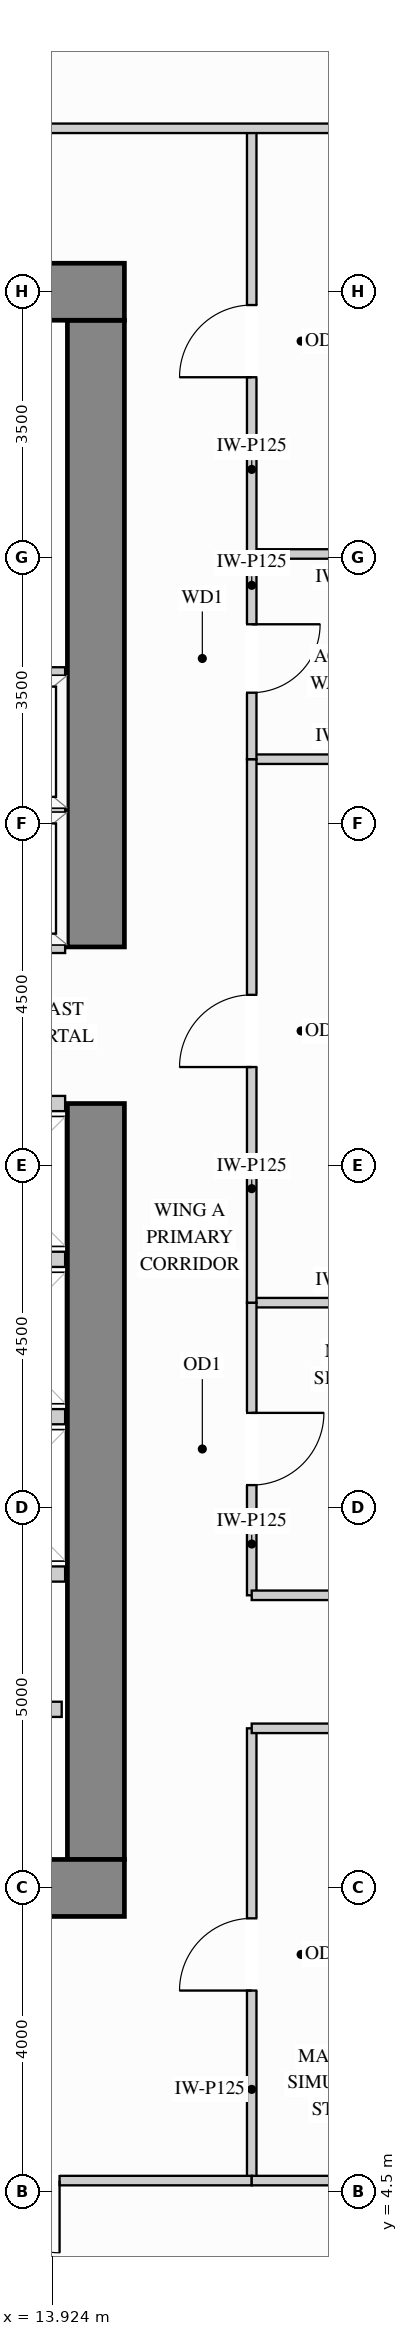
"""IFC4 building model, lengths in metres.
Left out: names, types, materials, properties, quantities, classifications, styles, units other than length and angle.
Written with IfcOpenShell. Run it as: python <this file> out.ifc"""

import sys

from ifc_helpers import new_model, si_unit, direction, frame, frame_2d, origin, place, context, subcontext, project, spatial, rectangle, extrude, source, transform, mapped, element, fill, save


model = new_model("IFC4")
c1 = context("Model", 3, precision=1e-05, world=origin(), true_north=direction((0.0, 1.0)))
c2 = subcontext(c1, "Body", "Model", "MODEL_VIEW")
j1 = project(units=[si_unit("LENGTHUNIT", "METRE"), si_unit("PLANEANGLEUNIT", "RADIAN")], contexts=[c1])
p1 = place(None, origin())
s1 = spatial("IfcSite", under=j1, at=p1, CompositionType="ELEMENT")
p2 = place(p1, origin())
s2 = spatial("IfcBuilding", under=s1, at=p2, CompositionType="ELEMENT")
p3 = place(p2, frame((0.0, 0.0, 102.6)))
s3 = spatial("IfcBuildingStorey", under=s2, at=p3, CompositionType="ELEMENT", Elevation=102.6)
m1 = source(origin(), c2, "Body", "SweptSolid", [
    extrude(rectangle(XDim=9.945, YDim=0.75, at=frame_2d((4.973, 0.0))), origin(), (0.0, 0.0, 1.0), 3.38),
])
p4 = place(p3, frame((14.5, 8.875, 0.0), z_axis=(0.0, 0.0, 1.0), x_axis=(0.0, 1.0, 0.0)))
e1 = element("IfcWall", 1, at=p4, inside=s3, PredefinedType="SHEAR", context=c2, shape_type="MappedRepresentation", body=[
    mapped(m1, transform((0.0, 0.0, 0.0), x_axis=(1.0, 0.0, 0.0), y_axis=(0.0, 1.0, 0.0), z_axis=(0.0, 0.0, 1.0))),
])
m2 = source(origin(), c2, "Body", "SweptSolid", [
    extrude(rectangle(XDim=8.245, YDim=0.75, at=frame_2d((4.123, 0.0))), origin(), (0.0, 0.0, 1.0), 3.38),
])
p5 = place(p3, frame((14.5, 20.88, 0.0), z_axis=(0.0, 0.0, 1.0), x_axis=(0.0, 1.0, 0.0)))
e2 = element("IfcWall", 2, at=p5, inside=s3, PredefinedType="SHEAR", context=c2, shape_type="MappedRepresentation", body=[
    mapped(m2, transform((0.0, 0.0, 0.0), x_axis=(1.0, 0.0, 0.0), y_axis=(0.0, 1.0, 0.0), z_axis=(0.0, 0.0, 1.0))),
])
m3 = source(origin(), c2, "Body", "SweptSolid", [
    extrude(rectangle(XDim=10.75, YDim=0.75, at=frame_2d((5.375, 0.0))), origin(), (0.0, 0.0, 1.0), 3.38),
])
for number, where, z_axis, x_axis in (
    (3, (4.125, 29.5, 0.0), (0.0, 0.0, 1.0), (1.0, 0.0, 0.0)),
    (4, (4.125, 8.5, 0.0), (0.0, 0.0, 1.0), (1.0, 0.0, 0.0)),
):
    element("IfcWall", number, at=place(p3, frame(where, z_axis=z_axis, x_axis=x_axis)), inside=s3, PredefinedType="SHEAR", context=c2, shape_type="MappedRepresentation", body=[
        mapped(m3, transform((0.0, 0.0, 0.0), x_axis=(1.0, 0.0, 0.0), y_axis=(0.0, 1.0, 0.0), z_axis=(0.0, 0.0, 1.0))),
    ])
m4 = source(origin(), c2, "Body", "SweptSolid", [
    extrude(rectangle(XDim=2.6, YDim=0.125, at=frame_2d((1.3, 0.0))), origin(), (0.0, 0.0, 1.0), 3.365),
])
p6 = place(p3, frame((16.55, 16.2, 0.0), z_axis=(0.0, 0.0, 1.0), x_axis=(1.0, 0.0, 0.0)))
e5 = element("IfcWall", 5, at=p6, inside=s3, PredefinedType="PARTITIONING", context=c2, shape_type="MappedRepresentation", body=[
    mapped(m4, transform((0.0, 0.0, 0.0), x_axis=(1.0, 0.0, 0.0), y_axis=(0.0, 1.0, 0.0), z_axis=(0.0, 0.0, 1.0))),
])
m5 = source(origin(), c2, "Body", "SweptSolid", [
    extrude(rectangle(XDim=2.598, YDim=0.125, at=frame_2d((1.299, 0.0))), origin(), (0.0, 0.0, 1.0), 3.365),
])
for number, where, z_axis, x_axis in (
    (6, (16.55, 23.35, 0.0), (0.0, 0.0, 1.0), (1.0, 0.0, 0.0)),
    (7, (16.55, 26.05, 0.0), (0.0, 0.0, 1.0), (1.0, 0.0, 0.0)),
):
    element("IfcWall", number, at=place(p3, frame(where, z_axis=z_axis, x_axis=x_axis)), inside=s3, PredefinedType="PARTITIONING", context=c2, shape_type="MappedRepresentation", body=[
        mapped(m5, transform((0.0, 0.0, 0.0), x_axis=(1.0, 0.0, 0.0), y_axis=(0.0, 1.0, 0.0), z_axis=(0.0, 0.0, 1.0))),
    ])
p7 = place(p3, frame((16.55, 12.35, 0.0), z_axis=(0.0, 0.0, 1.0), x_axis=(0.0, 1.0, 0.0)))
e8 = element("IfcWall", 8, at=p7, inside=s3, PredefinedType="PARTITIONING", context=c2, shape_type="SweptSolid", body=[
    extrude(rectangle(XDim=3.85, YDim=0.125, at=frame_2d((1.925, 0.0))), origin(), (0.0, 0.0, 1.0), 3.365),
])
p8 = place(p7, frame((1.45, 0.0, 0.0)))
e9 = element("IfcOpeningElement", 9, at=p8, cuts=e8, PredefinedType="OPENING", context=c2, shape_type="SweptSolid", body=[
    extrude(rectangle(XDim=0.95, YDim=2.15, at=frame_2d((0.475, 1.075))), frame((0.0, 0.073, 0.0), z_axis=(0.0, -1.0, 0.0), x_axis=(1.0, 0.0, 0.0)), (0.0, 0.0, 1.0), 0.145),
])
p9 = place(p3, frame((16.55, 16.2, 0.0), z_axis=(0.0, 0.0, 1.0), x_axis=(0.0, 1.0, 0.0)))
e10 = element("IfcWall", 10, at=p9, inside=s3, PredefinedType="PARTITIONING", context=c2, shape_type="SweptSolid", body=[
    extrude(rectangle(XDim=7.15, YDim=0.125, at=frame_2d((3.575, 0.0))), origin(), (0.0, 0.0, 1.0), 3.365),
])
p10 = place(p9, frame((3.1, 0.0, 0.0)))
e11 = element("IfcOpeningElement", 11, at=p10, cuts=e10, PredefinedType="OPENING", context=c2, shape_type="SweptSolid", body=[
    extrude(rectangle(XDim=0.95, YDim=2.15, at=frame_2d((0.475, 1.075))), frame((0.0, 0.073, 0.0), z_axis=(0.0, -1.0, 0.0), x_axis=(1.0, 0.0, 0.0)), (0.0, 0.0, 1.0), 0.145),
])
p11 = place(p3, frame((16.55, 26.05, 0.0), z_axis=(0.0, 0.0, 1.0), x_axis=(0.0, 1.0, 0.0)))
e12 = element("IfcWall", 12, at=p11, inside=s3, PredefinedType="PARTITIONING", context=c2, shape_type="SweptSolid", body=[
    extrude(rectangle(XDim=5.6, YDim=0.125, at=frame_2d((2.8, 0.0))), origin(), (0.0, 0.0, 1.0), 3.365),
])
p12 = place(p11, frame((2.325, 0.0, 0.0)))
e13 = element("IfcOpeningElement", 13, at=p12, cuts=e12, PredefinedType="OPENING", context=c2, shape_type="SweptSolid", body=[
    extrude(rectangle(XDim=0.95, YDim=2.15, at=frame_2d((0.475, 1.075))), frame((0.0, 0.073, 0.0), z_axis=(0.0, -1.0, 0.0), x_axis=(1.0, 0.0, 0.0)), (0.0, 0.0, 1.0), 0.145),
])
p13 = place(p3, frame((16.55, 4.65, 0.0), z_axis=(0.0, 0.0, 1.0), x_axis=(0.0, 1.0, 0.0)))
e14 = element("IfcWall", 14, at=p13, inside=s3, PredefinedType="PARTITIONING", context=c2, shape_type="SweptSolid", body=[
    extrude(rectangle(XDim=5.95, YDim=0.125, at=frame_2d((2.975, 0.0))), origin(), (0.0, 0.0, 1.0), 3.365),
])
p14 = place(p13, frame((2.5, 0.0, 0.0)))
e15 = element("IfcOpeningElement", 15, at=p14, cuts=e14, PredefinedType="OPENING", context=c2, shape_type="SweptSolid", body=[
    extrude(rectangle(XDim=0.95, YDim=2.15, at=frame_2d((0.475, 1.075))), frame((0.0, 0.073, 0.0), z_axis=(0.0, -1.0, 0.0), x_axis=(1.0, 0.0, 0.0)), (0.0, 0.0, 1.0), 0.145),
])
p15 = place(p3, frame((16.55, 23.35, 0.0), z_axis=(0.0, 0.0, 1.0), x_axis=(0.0, 1.0, 0.0)))
e16 = element("IfcWall", 16, at=p15, inside=s3, PredefinedType="PARTITIONING", context=c2, shape_type="SweptSolid", body=[
    extrude(rectangle(XDim=2.7, YDim=0.125, at=frame_2d((1.35, 0.0))), origin(), (0.0, 0.0, 1.0), 3.365),
])
p16 = place(p15, frame((0.875, 0.0, 0.0)))
e17 = element("IfcOpeningElement", 17, at=p16, cuts=e16, PredefinedType="OPENING", context=c2, shape_type="SweptSolid", body=[
    extrude(rectangle(XDim=0.9, YDim=2.15, at=frame_2d((0.45, 1.075))), frame((0.0, 0.073, 0.0), z_axis=(0.0, -1.0, 0.0), x_axis=(1.0, 0.0, 0.0)), (0.0, 0.0, 1.0), 0.145),
])
m6 = source(origin(), c2, "Body", "SweptSolid", [
    extrude(rectangle(XDim=7.498, YDim=0.125, at=frame_2d((3.749, 0.0))), origin(), (0.0, 0.0, 1.0), 2.828),
])
p17 = place(p3, frame((11.65, 31.65, 0.0), z_axis=(0.0, 0.0, 1.0), x_axis=(1.0, 0.0, 0.0)))
e18 = element("IfcWall", 18, at=p17, inside=s3, PredefinedType="PARTITIONING", context=c2, shape_type="MappedRepresentation", body=[
    mapped(m6, transform((0.0, 0.0, 0.0), x_axis=(1.0, 0.0, 0.0), y_axis=(0.0, 1.0, 0.0), z_axis=(0.0, 0.0, 1.0))),
])
m7 = source(origin(), c2, "Body", "SweptSolid", [
    extrude(rectangle(XDim=2.95, YDim=0.125, at=frame_2d((1.475, 0.0))), origin(), (0.0, 0.0, 1.0), 3.365),
])
for number, where, z_axis, x_axis in (
    (19, (16.55, 12.35, 0.0), (0.0, 0.0, 1.0), (1.0, 0.0, 0.0)),
    (20, (16.55, 10.6, 0.0), (0.0, 0.0, 1.0), (1.0, 0.0, 0.0)),
):
    element("IfcWall", number, at=place(p3, frame(where, z_axis=z_axis, x_axis=x_axis)), inside=s3, PredefinedType="PARTITIONING", context=c2, shape_type="MappedRepresentation", body=[
        mapped(m7, transform((0.0, 0.0, 0.0), x_axis=(1.0, 0.0, 0.0), y_axis=(0.0, 1.0, 0.0), z_axis=(0.0, 0.0, 1.0))),
    ])
p18 = place(p3, frame((10.544, 4.65, 0.0), z_axis=(0.0, 0.0, 1.0), x_axis=(1.0, 0.0, 0.0)))
e21 = element("IfcWall", 21, at=p18, inside=s3, PredefinedType="PARTITIONING", context=c2, shape_type="SweptSolid", body=[
    extrude(rectangle(XDim=6.006, YDim=0.125, at=frame_2d((3.003, 0.0))), origin(), (0.0, 0.0, 1.0), 2.828),
])
p19 = place(p18, frame((2.528, 0.0, 0.0)))
e22 = element("IfcOpeningElement", 22, at=p19, cuts=e21, PredefinedType="OPENING", context=c2, shape_type="SweptSolid", body=[
    extrude(rectangle(XDim=0.95, YDim=2.15, at=frame_2d((0.475, 1.075))), frame((0.0, 0.073, 0.0), z_axis=(0.0, -1.0, 0.0), x_axis=(1.0, 0.0, 0.0)), (0.0, 0.0, 1.0), 0.145),
])
m8 = source(origin(), c2, "Body", "SweptSolid", [
    extrude(rectangle(XDim=2.598, YDim=0.125, at=frame_2d((1.299, 0.0))), origin(), (0.0, 0.0, 1.0), 2.828),
])
p20 = place(p3, frame((16.55, 4.65, 0.0), z_axis=(0.0, 0.0, 1.0), x_axis=(1.0, 0.0, 0.0)))
e23 = element("IfcWall", 23, at=p20, inside=s3, PredefinedType="PARTITIONING", context=c2, shape_type="MappedRepresentation", body=[
    mapped(m8, transform((0.0, 0.0, 0.0), x_axis=(1.0, 0.0, 0.0), y_axis=(0.0, 1.0, 0.0), z_axis=(0.0, 0.0, 1.0))),
])
m9 = source(origin(), c2, "Body", "SweptSolid", [
    extrude(rectangle(XDim=1.63, YDim=0.2, at=frame_2d((0.815, 0.0))), origin(), (0.0, 0.0, 1.0), 3.365),
])
p21 = place(p3, frame((12.42, 10.85, 0.0), z_axis=(0.0, 0.0, 1.0), x_axis=(1.0, 0.0, 0.0)))
e24 = element("IfcWall", 24, at=p21, inside=s3, PredefinedType="PARTITIONING", context=c2, shape_type="MappedRepresentation", body=[
    mapped(m9, transform((0.0, 0.0, 0.0), x_axis=(1.0, 0.0, 0.0), y_axis=(0.0, 1.0, 0.0), z_axis=(0.0, 0.0, 1.0))),
])
m10 = source(origin(), c2, "Body", "SweptSolid", [
    extrude(rectangle(XDim=2.265, YDim=0.2, at=frame_2d((1.132, 0.0))), origin(), (0.0, 0.0, 1.0), 3.365),
])
for number, where, z_axis, x_axis in (
    (25, (11.83, 22.66, 0.0), (0.0, 0.0, 1.0), (1.0, 0.0, 0.0)),
    (26, (11.83, 20.9, 0.0), (0.0, 0.0, 1.0), (1.0, 0.0, 0.0)),
    (27, (11.83, 24.46, 0.0), (0.0, 0.0, 1.0), (1.0, 0.0, 0.0)),
):
    element("IfcWall", number, at=place(p3, frame(where, z_axis=z_axis, x_axis=x_axis)), inside=s3, PredefinedType="PARTITIONING", context=c2, shape_type="MappedRepresentation", body=[
        mapped(m10, transform((0.0, 0.0, 0.0), x_axis=(1.0, 0.0, 0.0), y_axis=(0.0, 1.0, 0.0), z_axis=(0.0, 0.0, 1.0))),
    ])
m11 = source(origin(), c2, "Body", "SweptSolid", [
    extrude(rectangle(XDim=1.865, YDim=0.2, at=frame_2d((0.933, 0.0))), origin(), (0.0, 0.0, 1.0), 3.365),
])
for number, where, z_axis, x_axis in (
    (28, (12.23, 14.7, 0.0), (0.0, 0.0, 1.0), (1.0, 0.0, 0.0)),
    (29, (12.23, 12.63, 0.0), (0.0, 0.0, 1.0), (1.0, 0.0, 0.0)),
    (30, (12.23, 16.77, 0.0), (0.0, 0.0, 1.0), (1.0, 0.0, 0.0)),
    (31, (12.23, 18.82, 0.0), (0.0, 0.0, 1.0), (1.0, 0.0, 0.0)),
):
    element("IfcWall", number, at=place(p3, frame(where, z_axis=z_axis, x_axis=x_axis)), inside=s3, PredefinedType="PARTITIONING", context=c2, shape_type="MappedRepresentation", body=[
        mapped(m11, transform((0.0, 0.0, 0.0), x_axis=(1.0, 0.0, 0.0), y_axis=(0.0, 1.0, 0.0), z_axis=(0.0, 0.0, 1.0))),
    ])
m12 = source(origin(), c2, "Body", "SweptSolid", [
    extrude(rectangle(XDim=0.95, YDim=2.15, at=frame_2d((0.475, 1.075))), frame((0.0, 0.025, 0.0), z_axis=(0.0, -1.0, 0.0), x_axis=(1.0, 0.0, 0.0)), (0.0, 0.0, 1.0), 0.05),
])
p22 = place(p14, origin())
e32 = element("IfcDoor", 32, at=p22, inside=s3, OperationType="SINGLE_SWING_LEFT", PredefinedType="DOOR", context=c2, shape_type="MappedRepresentation", body=[
    mapped(m12, transform((0.0, 0.0, 0.0), x_axis=(1.0, 0.0, 0.0), y_axis=(0.0, 1.0, 0.0), z_axis=(0.0, 0.0, 1.0))),
])
fill(e15, e32)
p23 = place(p8, origin())
e33 = element("IfcDoor", 33, at=p23, inside=s3, OperationType="SINGLE_SWING_RIGHT", PredefinedType="DOOR", context=c2, shape_type="MappedRepresentation", body=[
    mapped(m12, transform((0.0, 0.0, 0.0), x_axis=(1.0, 0.0, 0.0), y_axis=(0.0, 1.0, 0.0), z_axis=(0.0, 0.0, 1.0))),
])
fill(e9, e33)
p24 = place(p10, origin())
e34 = element("IfcDoor", 34, at=p24, inside=s3, OperationType="SINGLE_SWING_LEFT", PredefinedType="DOOR", context=c2, shape_type="MappedRepresentation", body=[
    mapped(m12, transform((0.0, 0.0, 0.0), x_axis=(1.0, 0.0, 0.0), y_axis=(0.0, 1.0, 0.0), z_axis=(0.0, 0.0, 1.0))),
])
fill(e11, e34)
p25 = place(p12, origin())
e35 = element("IfcDoor", 35, at=p25, inside=s3, OperationType="SINGLE_SWING_LEFT", PredefinedType="DOOR", context=c2, shape_type="MappedRepresentation", body=[
    mapped(m12, transform((0.0, 0.0, 0.0), x_axis=(1.0, 0.0, 0.0), y_axis=(0.0, 1.0, 0.0), z_axis=(0.0, 0.0, 1.0))),
])
fill(e13, e35)
p26 = place(p19, origin())
e36 = element("IfcDoor", 36, at=p26, inside=s3, OperationType="SINGLE_SWING_RIGHT", PredefinedType="DOOR", context=c2, shape_type="MappedRepresentation", body=[
    mapped(m12, transform((0.0, 0.0, 0.0), x_axis=(1.0, 0.0, 0.0), y_axis=(0.0, 1.0, 0.0), z_axis=(0.0, 0.0, 1.0))),
])
fill(e22, e36)
m13 = source(origin(), c2, "Body", "SweptSolid", [
    extrude(rectangle(XDim=0.9, YDim=2.15, at=frame_2d((0.45, 1.075))), frame((0.0, 0.025, 0.0), z_axis=(0.0, -1.0, 0.0), x_axis=(1.0, 0.0, 0.0)), (0.0, 0.0, 1.0), 0.05),
])
p27 = place(p16, origin())
e37 = element("IfcDoor", 37, at=p27, inside=s3, OperationType="SINGLE_SWING_RIGHT", PredefinedType="DOOR", context=c2, shape_type="MappedRepresentation", body=[
    mapped(m13, transform((0.0, 0.0, 0.0), x_axis=(1.0, 0.0, 0.0), y_axis=(0.0, 1.0, 0.0), z_axis=(0.0, 0.0, 1.0))),
])
fill(e17, e37)
save(model, sys.argv[1])
